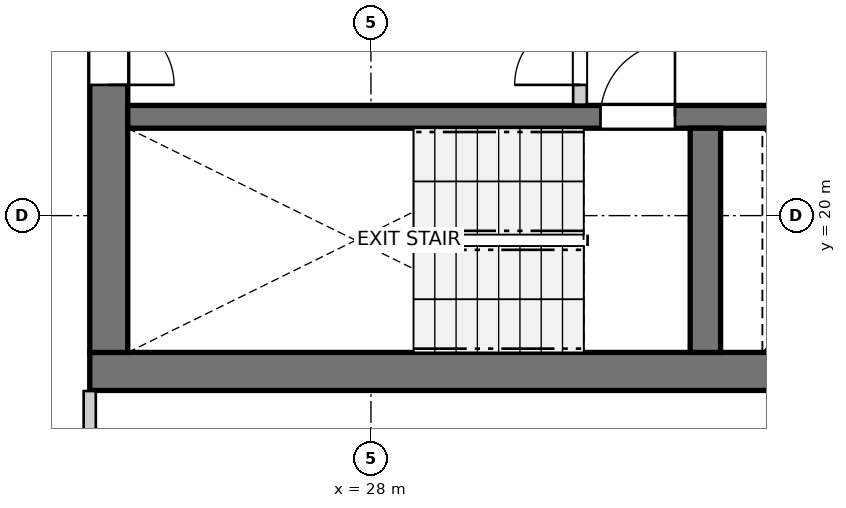
"""IFC4 building model, lengths in metres.
Left out: names, types, materials, properties, quantities, classifications, styles, units other than length and angle.
Written with IfcOpenShell. Run it as: python <this file> out.ifc"""

import sys

from ifc_helpers import new_model, si_unit, direction, frame, frame_2d, origin, place, context, subcontext, project, spatial, rectangle, extrude, source, transform, mapped, element, fill, save


model = new_model("IFC4")
c1 = context("Model", 3, precision=1e-05, world=origin(), true_north=direction((0.0, 1.0)))
c2 = subcontext(c1, "Body", "Model", "MODEL_VIEW")
j1 = project(units=[si_unit("LENGTHUNIT", "METRE"), si_unit("PLANEANGLEUNIT", "RADIAN")], contexts=[c1])
p1 = place(None, origin())
s1 = spatial("IfcSite", under=j1, at=p1, CompositionType="ELEMENT")
p2 = place(p1, origin())
s2 = spatial("IfcBuilding", under=s1, at=p2, CompositionType="ELEMENT")
p3 = place(p2, frame((0.0, 0.0, 195.6)))
s3 = spatial("IfcBuildingStorey", under=s2, at=p3, CompositionType="ELEMENT", Elevation=195.6)
p4 = place(p3, frame((24.3, 17.95, 0.0), z_axis=(0.0, 0.0, 1.0), x_axis=(1.0, 0.0, 0.0)))
e1 = element("IfcWall", 1, at=p4, inside=s3, PredefinedType="SHEAR", context=c2, shape_type="SweptSolid", body=[
    extrude(rectangle(XDim=12.1, YDim=0.5, at=frame_2d((6.05, 0.0))), origin(), (0.0, 0.0, 1.0), 2.96),
])
p5 = place(p3, frame((24.55, 33.8, 0.0), z_axis=(0.0, 0.0, 1.0), x_axis=(0.0, -1.0, 0.0)))
e2 = element("IfcWall", 2, at=p5, inside=s3, PredefinedType="SHEAR", context=c2, shape_type="SweptSolid", body=[
    extrude(rectangle(XDim=15.6, YDim=0.5, at=frame_2d((7.8, 0.0))), origin(), (0.0, 0.0, 1.0), 2.96),
])
p6 = place(p5, frame((7.05, 0.0, 0.0)))
e3 = element("IfcOpeningElement", 3, at=p6, cuts=e2, PredefinedType="OPENING", context=c2, shape_type="SweptSolid", body=[
    extrude(rectangle(XDim=1.5, YDim=2.15, at=frame_2d((0.75, 1.075))), frame((0.0, 0.26, 0.0), z_axis=(0.0, -1.0, 0.0), x_axis=(1.0, 0.0, 0.0)), (0.0, 0.0, 1.0), 0.52),
])
p7 = place(p5, frame((3.52, 0.0, 0.0)))
e4 = element("IfcOpeningElement", 4, at=p7, cuts=e2, PredefinedType="OPENING", context=c2, shape_type="SweptSolid", body=[
    extrude(rectangle(XDim=0.86, YDim=2.05, at=frame_2d((0.43, 1.025))), frame((0.0, 0.26, 0.0), z_axis=(0.0, -1.0, 0.0), x_axis=(1.0, 0.0, 0.0)), (0.0, 0.0, 1.0), 0.52),
])
p8 = place(p5, frame((11.22, 0.0, 0.0)))
e5 = element("IfcOpeningElement", 5, at=p8, cuts=e2, PredefinedType="OPENING", context=c2, shape_type="SweptSolid", body=[
    extrude(rectangle(XDim=0.86, YDim=2.05, at=frame_2d((0.43, 1.025))), frame((0.0, 0.26, 0.0), z_axis=(0.0, -1.0, 0.0), x_axis=(1.0, 0.0, 0.0)), (0.0, 0.0, 1.0), 0.52),
])
p9 = place(p3, frame((24.8, 21.3, 0.0), z_axis=(0.0, 0.0, 1.0), x_axis=(1.0, 0.0, 0.0)))
e6 = element("IfcWall", 6, at=p9, inside=s3, PredefinedType="SHEAR", context=c2, shape_type="SweptSolid", body=[
    extrude(rectangle(XDim=11.1, YDim=0.3, at=frame_2d((5.55, 0.0))), origin(), (0.0, 0.0, 1.0), 2.96),
])
p10 = place(p9, frame((6.22, 0.0, 0.0)))
e7 = element("IfcOpeningElement", 7, at=p10, cuts=e6, PredefinedType="OPENING", context=c2, shape_type="SweptSolid", body=[
    extrude(rectangle(XDim=0.98, YDim=2.15, at=frame_2d((0.49, 1.075))), frame((0.0, 0.16, 0.0), z_axis=(0.0, -1.0, 0.0), x_axis=(1.0, 0.0, 0.0)), (0.0, 0.0, 1.0), 0.32),
])
p11 = place(p9, frame((9.15, 0.0, 0.0)))
e8 = element("IfcOpeningElement", 8, at=p11, cuts=e6, PredefinedType="OPENING", context=c2, shape_type="SweptSolid", body=[
    extrude(rectangle(XDim=1.15, YDim=2.15, at=frame_2d((0.575, 1.075))), frame((0.0, 0.16, 0.0), z_axis=(0.0, -1.0, 0.0), x_axis=(1.0, 0.0, 0.0)), (0.0, 0.0, 1.0), 0.32),
])
p12 = place(p3, frame((32.4, 18.2, 0.0), z_axis=(0.0, 0.0, 1.0), x_axis=(0.0, 1.0, 0.0)))
e9 = element("IfcWall", 9, at=p12, inside=s3, PredefinedType="SHEAR", context=c2, shape_type="SweptSolid", body=[
    extrude(rectangle(XDim=2.95, YDim=0.4, at=frame_2d((1.475, 0.0))), origin(), (0.0, 0.0, 1.0), 2.96),
])
p13 = place(p3, frame((30.75, 21.46, 0.0), z_axis=(0.0, 0.0, 1.0), x_axis=(0.0, 1.0, 0.0)))
e10 = element("IfcWall", 10, at=p13, inside=s3, PredefinedType="PARTITIONING", context=c2, shape_type="SweptSolid", body=[
    extrude(rectangle(XDim=3.11, YDim=0.18, at=frame_2d((1.555, 0.0))), origin(), (0.0, 0.0, 1.0), 2.96),
])
p14 = place(p13, frame((0.26, 0.0, 0.0)))
e11 = element("IfcOpeningElement", 11, at=p14, cuts=e10, PredefinedType="OPENING", context=c2, shape_type="SweptSolid", body=[
    extrude(rectangle(XDim=0.86, YDim=2.05, at=frame_2d((0.43, 1.025))), frame((0.0, 0.1, 0.0), z_axis=(0.0, -1.0, 0.0), x_axis=(1.0, 0.0, 0.0)), (0.0, 0.0, 1.0), 0.2),
])
p15 = place(p3, frame((24.3, 17.692, 0.0), z_axis=(0.0, 0.0, 1.0), x_axis=(0.0, -1.0, 0.0)))
e12 = element("IfcWall", 12, at=p15, inside=s3, PredefinedType="PARTITIONING", context=c2, shape_type="SweptSolid", body=[
    extrude(rectangle(XDim=2.731, YDim=0.16, at=frame_2d((1.365, 0.0))), origin(), (0.0, 0.0, 1.0), 2.96),
])
p16 = place(p15, frame((0.882, 0.0, 0.0)))
e13 = element("IfcOpeningElement", 13, at=p16, cuts=e12, PredefinedType="OPENING", context=c2, shape_type="SweptSolid", body=[
    extrude(rectangle(XDim=0.96, YDim=2.1, at=frame_2d((0.48, 1.05))), frame((0.0, 0.09, 0.0), z_axis=(0.0, -1.0, 0.0), x_axis=(1.0, 0.0, 0.0)), (0.0, 0.0, 1.0), 0.18),
])
m1 = source(origin(), c2, "Body", "SweptSolid", [
    extrude(rectangle(XDim=0.98, YDim=2.15, at=frame_2d((0.49, 1.075))), frame((0.0, 0.025, 0.0), z_axis=(0.0, -1.0, 0.0), x_axis=(1.0, 0.0, 0.0)), (0.0, 0.0, 1.0), 0.05),
])
p17 = place(p10, origin())
e14 = element("IfcDoor", 14, at=p17, inside=s3, OperationType="SINGLE_SWING_RIGHT", PredefinedType="DOOR", context=c2, shape_type="MappedRepresentation", body=[
    mapped(m1, transform((0.0, 0.0, 0.0), x_axis=(1.0, 0.0, 0.0), y_axis=(0.0, 1.0, 0.0), z_axis=(0.0, 0.0, 1.0), scale=1.0)),
])
fill(e7, e14)
m2 = source(origin(), c2, "Body", "SweptSolid", [
    extrude(rectangle(XDim=0.86, YDim=2.05, at=frame_2d((0.43, 1.025))), frame((0.0, 0.025, 0.0), z_axis=(0.0, -1.0, 0.0), x_axis=(1.0, 0.0, 0.0)), (0.0, 0.0, 1.0), 0.05),
])
p18 = place(p8, origin())
e15 = element("IfcDoor", 15, at=p18, inside=s3, OperationType="SINGLE_SWING_RIGHT", PredefinedType="DOOR", context=c2, shape_type="MappedRepresentation", body=[
    mapped(m2, transform((0.0, 0.0, 0.0), x_axis=(1.0, 0.0, 0.0), y_axis=(0.0, 1.0, 0.0), z_axis=(0.0, 0.0, 1.0), scale=1.0)),
])
fill(e5, e15)
p19 = place(p14, origin())
e16 = element("IfcDoor", 16, at=p19, inside=s3, OperationType="SINGLE_SWING_LEFT", PredefinedType="DOOR", context=c2, shape_type="MappedRepresentation", body=[
    mapped(m2, transform((0.0, 0.0, 0.0), x_axis=(1.0, 0.0, 0.0), y_axis=(0.0, 1.0, 0.0), z_axis=(0.0, 0.0, 1.0), scale=1.0)),
])
fill(e11, e16)
save(model, sys.argv[1])
